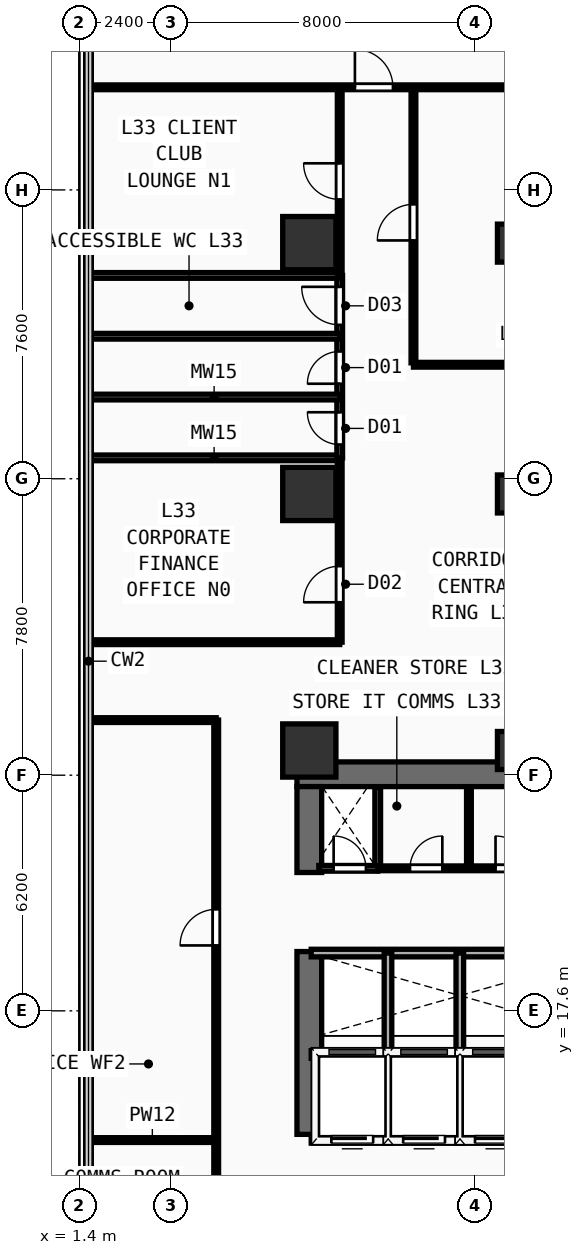
"""IFC4 building model, lengths in metres.
Left out: names, types, materials, properties, quantities, classifications, styles, units other than length and angle.
Written with IfcOpenShell. Run it as: python <this file> out.ifc"""

import sys

from ifc_helpers import new_model, si_unit, direction, frame, frame_2d, origin, origin_2d, place, context, subcontext, project, spatial, rectangle, extrude, element, fill, save


model = new_model("IFC4")
c1 = context("Model", 3, precision=1e-05, world=origin(), true_north=direction((0.0, 1.0)))
c2 = subcontext(c1, "Body", "Model", "MODEL_VIEW")
j1 = project(units=[si_unit("LENGTHUNIT", "METRE"), si_unit("PLANEANGLEUNIT", "RADIAN")], contexts=[c1])
p1 = place(None, origin())
s1 = spatial("IfcSite", under=j1, at=p1, CompositionType="ELEMENT")
p2 = place(p1, origin())
s2 = spatial("IfcBuilding", under=s1, at=p2, CompositionType="ELEMENT")
p3 = place(p2, frame((0.0, 0.0, 129.7)))
s3 = spatial("IfcBuildingStorey", under=s2, at=p3, CompositionType="ELEMENT", Elevation=129.7)
p4 = place(p3, frame((7.125, 23.825, 0.0), z_axis=(0.0, 0.0, 1.0), x_axis=(1.0, 0.0, 0.0)))
e1 = element("IfcWall", 1, at=p4, inside=s3, PredefinedType="SHEAR", context=c2, shape_type="SweptSolid", body=[
    extrude(rectangle(XDim=14.0, YDim=0.65, at=frame_2d((7.0, 0.0))), origin(), (0.0, 0.0, 1.0), 3.54),
])
p5 = place(p3, frame((7.45, 14.35, 0.0), z_axis=(0.0, 0.0, 1.0), x_axis=(0.0, 1.0, 0.0)))
e2 = element("IfcWall", 2, at=p5, inside=s3, PredefinedType="SHEAR", context=c2, shape_type="SweptSolid", body=[
    extrude(rectangle(XDim=4.81, YDim=0.65, at=frame_2d((2.405, 0.0))), origin(), (0.0, 0.0, 1.0), 3.54),
])
p6 = place(p3, frame((7.45, 21.24, 0.0), z_axis=(0.0, 0.0, 1.0), x_axis=(0.0, 1.0, 0.0)))
e3 = element("IfcWall", 3, at=p6, inside=s3, PredefinedType="SHEAR", context=c2, shape_type="SweptSolid", body=[
    extrude(rectangle(XDim=2.26, YDim=0.65, at=frame_2d((1.13, 0.0))), origin(), (0.0, 0.0, 1.0), 3.54),
])
for number, where, z_axis, x_axis in (
    (4, (7.45, 24.45, 0.0), (0.0, 0.0, 1.0), (1.0, 0.0, 0.0)),
    (5, (7.45, 31.2, 0.0), (0.0, 0.0, 1.0), (1.0, 0.0, 0.0)),
    (6, (7.45, 37.8, 0.0), (0.0, 0.0, 1.0), (1.0, 0.0, 0.0)),
):
    element("IfcColumn", number, at=place(p3, frame(where, z_axis=z_axis, x_axis=x_axis)), inside=s3, PredefinedType="COLUMN", context=c2, shape_type="SweptSolid", body=[
        extrude(rectangle(XDim=1.4, YDim=1.4, at=origin_2d()), origin(), (0.0, 0.0, 1.0), 3.54),
    ])
for number, where, z_axis, x_axis in (
    (7, (12.9, 24.45, 0.0), (0.0, 0.0, 1.0), (1.0, 0.0, 0.0)),
    (8, (12.9, 31.2, 0.0), (0.0, 0.0, 1.0), (1.0, 0.0, 0.0)),
    (9, (12.9, 37.8, 0.0), (0.0, 0.0, 1.0), (1.0, 0.0, 0.0)),
):
    element("IfcColumn", number, at=place(p3, frame(where, z_axis=z_axis, x_axis=x_axis)), inside=s3, PredefinedType="COLUMN", context=c2, shape_type="SweptSolid", body=[
        extrude(rectangle(XDim=1.0, YDim=1.0, at=origin_2d()), origin(), (0.0, 0.0, 1.0), 3.54),
    ])
p7 = place(p3, frame((7.5, 14.22, 0.0), z_axis=(0.0, 0.0, 1.0), x_axis=(1.0, 0.0, 0.0)))
e10 = element("IfcWall", 10, at=p7, inside=s3, PredefinedType="PARTITIONING", context=c2, shape_type="SweptSolid", body=[
    extrude(rectangle(XDim=7.85, YDim=0.2, at=frame_2d((3.925, 0.0))), origin(), (0.0, 0.0, 1.0), 3.54),
])
p8 = place(p7, frame((0.53, 0.0, 0.0)))
e11 = element("IfcOpeningElement", 11, at=p8, cuts=e10, PredefinedType="OPENING", context=c2, shape_type="SweptSolid", body=[
    extrude(rectangle(XDim=1.1, YDim=2.2, at=frame_2d((0.55, 1.1))), frame((0.0, 0.11, 0.0), z_axis=(0.0, -1.0, 0.0), x_axis=(1.0, 0.0, 0.0)), (0.0, 0.0, 1.0), 0.22),
])
p9 = place(p7, frame((2.42, 0.0, 0.0)))
e12 = element("IfcOpeningElement", 12, at=p9, cuts=e10, PredefinedType="OPENING", context=c2, shape_type="SweptSolid", body=[
    extrude(rectangle(XDim=1.1, YDim=2.2, at=frame_2d((0.55, 1.1))), frame((0.0, 0.11, 0.0), z_axis=(0.0, -1.0, 0.0), x_axis=(1.0, 0.0, 0.0)), (0.0, 0.0, 1.0), 0.22),
])
p10 = place(p7, frame((4.31, 0.0, 0.0)))
e13 = element("IfcOpeningElement", 13, at=p10, cuts=e10, PredefinedType="OPENING", context=c2, shape_type="SweptSolid", body=[
    extrude(rectangle(XDim=1.1, YDim=2.2, at=frame_2d((0.55, 1.1))), frame((0.0, 0.11, 0.0), z_axis=(0.0, -1.0, 0.0), x_axis=(1.0, 0.0, 0.0)), (0.0, 0.0, 1.0), 0.22),
])
p11 = place(p7, frame((6.2, 0.0, 0.0)))
e14 = element("IfcOpeningElement", 14, at=p11, cuts=e10, PredefinedType="OPENING", context=c2, shape_type="SweptSolid", body=[
    extrude(rectangle(XDim=1.1, YDim=2.2, at=frame_2d((0.55, 1.1))), frame((0.0, 0.11, 0.0), z_axis=(0.0, -1.0, 0.0), x_axis=(1.0, 0.0, 0.0)), (0.0, 0.0, 1.0), 0.22),
])
p12 = place(p3, frame((7.5, 16.45, 0.0), z_axis=(0.0, 0.0, 1.0), x_axis=(1.0, 0.0, 0.0)))
e15 = element("IfcWall", 15, at=p12, inside=s3, PredefinedType="PARTITIONING", context=c2, shape_type="SweptSolid", body=[
    extrude(rectangle(XDim=7.85, YDim=0.2, at=frame_2d((3.925, 0.0))), origin(), (0.0, 0.0, 1.0), 3.54),
])
for number, where, z_axis, x_axis in (
    (16, (9.52, 14.22, 0.0), (0.0, 0.0, 1.0), (0.0, 1.0, 0.0)),
    (17, (11.41, 14.22, 0.0), (0.0, 0.0, 1.0), (0.0, 1.0, 0.0)),
):
    element("IfcWall", number, at=place(p3, frame(where, z_axis=z_axis, x_axis=x_axis)), inside=s3, PredefinedType="PARTITIONING", context=c2, shape_type="SweptSolid", body=[
        extrude(rectangle(XDim=2.23, YDim=0.2, at=frame_2d((1.115, 0.0))), origin(), (0.0, 0.0, 1.0), 3.54),
    ])
p13 = place(p3, frame((7.5, 19.12, 0.0), z_axis=(0.0, 0.0, 1.0), x_axis=(1.0, 0.0, 0.0)))
e18 = element("IfcWall", 18, at=p13, inside=s3, PredefinedType="PARTITIONING", context=c2, shape_type="SweptSolid", body=[
    extrude(rectangle(XDim=7.85, YDim=0.2, at=frame_2d((3.925, 0.0))), origin(), (0.0, 0.0, 1.0), 3.54),
])
for number, where, z_axis, x_axis in (
    (19, (9.52, 16.45, 0.0), (0.0, 0.0, 1.0), (0.0, 1.0, 0.0)),
    (20, (11.41, 16.45, 0.0), (0.0, 0.0, 1.0), (0.0, 1.0, 0.0)),
):
    element("IfcWall", number, at=place(p3, frame(where, z_axis=z_axis, x_axis=x_axis)), inside=s3, PredefinedType="PARTITIONING", context=c2, shape_type="SweptSolid", body=[
        extrude(rectangle(XDim=2.67, YDim=0.2, at=frame_2d((1.335, 0.0))), origin(), (0.0, 0.0, 1.0), 3.54),
    ])
p14 = place(p3, frame((9.25, 21.35, 0.0), z_axis=(0.0, 0.0, 1.0), x_axis=(0.0, 1.0, 0.0)))
e21 = element("IfcWall", 21, at=p14, inside=s3, PredefinedType="PARTITIONING", context=c2, shape_type="SweptSolid", body=[
    extrude(rectangle(XDim=2.13, YDim=0.15, at=frame_2d((1.065, 0.0))), origin(), (0.0, 0.0, 1.0), 3.54),
])
p15 = place(p3, frame((7.7, 21.35, 0.0), z_axis=(0.0, 0.0, 1.0), x_axis=(1.0, 0.0, 0.0)))
e22 = element("IfcWall", 22, at=p15, inside=s3, PredefinedType="PARTITIONING", context=c2, shape_type="SweptSolid", body=[
    extrude(rectangle(XDim=1.55, YDim=0.15, at=frame_2d((0.775, 0.0))), origin(), (0.0, 0.0, 1.0), 3.54),
])
p16 = place(p15, frame((0.39, 0.0, 0.0)))
e23 = element("IfcOpeningElement", 23, at=p16, cuts=e22, PredefinedType="OPENING", context=c2, shape_type="SweptSolid", body=[
    extrude(rectangle(XDim=0.85, YDim=2.15, at=frame_2d((0.425, 1.075))), frame((0.0, 0.085, 0.0), z_axis=(0.0, -1.0, 0.0), x_axis=(1.0, 0.0, 0.0)), (0.0, 0.0, 1.0), 0.17),
])
p17 = place(p3, frame((9.25, 21.35, 0.0), z_axis=(0.0, 0.0, 1.0), x_axis=(1.0, 0.0, 0.0)))
e24 = element("IfcWall", 24, at=p17, inside=s3, PredefinedType="PARTITIONING", context=c2, shape_type="SweptSolid", body=[
    extrude(rectangle(XDim=4.65, YDim=0.125, at=frame_2d((2.325, 0.0))), origin(), (0.0, 0.0, 1.0), 3.54),
])
p18 = place(p17, frame((0.85, 0.0, 0.0)))
e25 = element("IfcOpeningElement", 25, at=p18, cuts=e24, PredefinedType="OPENING", context=c2, shape_type="SweptSolid", body=[
    extrude(rectangle(XDim=0.85, YDim=2.15, at=frame_2d((0.425, 1.075))), frame((0.0, 0.073, 0.0), z_axis=(0.0, -1.0, 0.0), x_axis=(1.0, 0.0, 0.0)), (0.0, 0.0, 1.0), 0.145),
])
p19 = place(p17, frame((3.1, 0.0, 0.0)))
e26 = element("IfcOpeningElement", 26, at=p19, cuts=e24, PredefinedType="OPENING", context=c2, shape_type="SweptSolid", body=[
    extrude(rectangle(XDim=0.85, YDim=2.15, at=frame_2d((0.425, 1.075))), frame((0.0, 0.073, 0.0), z_axis=(0.0, -1.0, 0.0), x_axis=(1.0, 0.0, 0.0)), (0.0, 0.0, 1.0), 0.145),
])
p20 = place(p3, frame((11.65, 21.35, 0.0), z_axis=(0.0, 0.0, 1.0), x_axis=(0.0, 1.0, 0.0)))
e27 = element("IfcWall", 27, at=p20, inside=s3, PredefinedType="PARTITIONING", context=c2, shape_type="SweptSolid", body=[
    extrude(rectangle(XDim=2.13, YDim=0.125, at=frame_2d((1.065, 0.0))), origin(), (0.0, 0.0, 1.0), 3.54),
])
p21 = place(p3, frame((8.25, 27.3, 0.0), z_axis=(0.0, 0.0, 1.0), x_axis=(0.0, 1.0, 0.0)))
e28 = element("IfcWall", 28, at=p21, inside=s3, PredefinedType="PARTITIONING", context=c2, shape_type="SweptSolid", body=[
    extrude(rectangle(XDim=4.85, YDim=0.125, at=frame_2d((2.425, 0.0))), origin(), (0.0, 0.0, 1.0), 3.54),
])
p22 = place(p21, frame((1.05, 0.0, 0.0)))
e29 = element("IfcOpeningElement", 29, at=p22, cuts=e28, PredefinedType="OPENING", context=c2, shape_type="SweptSolid", body=[
    extrude(rectangle(XDim=0.95, YDim=2.15, at=frame_2d((0.475, 1.075))), frame((0.0, 0.073, 0.0), z_axis=(0.0, -1.0, 0.0), x_axis=(1.0, 0.0, 0.0)), (0.0, 0.0, 1.0), 0.145),
])
p23 = place(p3, frame((1.64, 27.3, 0.0), z_axis=(0.0, 0.0, 1.0), x_axis=(1.0, 0.0, 0.0)))
e30 = element("IfcWall", 30, at=p23, inside=s3, PredefinedType="PARTITIONING", context=c2, shape_type="SweptSolid", body=[
    extrude(rectangle(XDim=6.61, YDim=0.125, at=frame_2d((3.305, 0.0))), origin(), (0.0, 0.0, 1.0), 3.54),
])
p24 = place(p3, frame((1.64, 32.15, 0.0), z_axis=(0.0, 0.0, 1.0), x_axis=(1.0, 0.0, 0.0)))
e31 = element("IfcWall", 31, at=p24, inside=s3, PredefinedType="PLUMBINGWALL", context=c2, shape_type="SweptSolid", body=[
    extrude(rectangle(XDim=6.61, YDim=0.15, at=frame_2d((3.305, 0.0))), origin(), (0.0, 0.0, 1.0), 3.54),
])
p25 = place(p3, frame((8.25, 32.15, 0.0), z_axis=(0.0, 0.0, 1.0), x_axis=(0.0, 1.0, 0.0)))
e32 = element("IfcWall", 32, at=p25, inside=s3, PredefinedType="PLUMBINGWALL", context=c2, shape_type="SweptSolid", body=[
    extrude(rectangle(XDim=4.8, YDim=0.15, at=frame_2d((2.4, 0.0))), origin(), (0.0, 0.0, 1.0), 3.54),
])
p26 = place(p25, frame((0.35, 0.0, 0.0)))
e33 = element("IfcOpeningElement", 33, at=p26, cuts=e32, PredefinedType="OPENING", context=c2, shape_type="SweptSolid", body=[
    extrude(rectangle(XDim=0.85, YDim=2.15, at=frame_2d((0.425, 1.075))), frame((0.0, 0.085, 0.0), z_axis=(0.0, -1.0, 0.0), x_axis=(1.0, 0.0, 0.0)), (0.0, 0.0, 1.0), 0.17),
])
p27 = place(p25, frame((1.95, 0.0, 0.0)))
e34 = element("IfcOpeningElement", 34, at=p27, cuts=e32, PredefinedType="OPENING", context=c2, shape_type="SweptSolid", body=[
    extrude(rectangle(XDim=0.85, YDim=2.15, at=frame_2d((0.425, 1.075))), frame((0.0, 0.085, 0.0), z_axis=(0.0, -1.0, 0.0), x_axis=(1.0, 0.0, 0.0)), (0.0, 0.0, 1.0), 0.17),
])
p28 = place(p25, frame((3.5, 0.0, 0.0)))
e35 = element("IfcOpeningElement", 35, at=p28, cuts=e32, PredefinedType="OPENING", context=c2, shape_type="SweptSolid", body=[
    extrude(rectangle(XDim=1.0, YDim=2.2, at=frame_2d((0.5, 1.1))), frame((0.0, 0.085, 0.0), z_axis=(0.0, -1.0, 0.0), x_axis=(1.0, 0.0, 0.0)), (0.0, 0.0, 1.0), 0.17),
])
for number, where, z_axis, x_axis in (
    (36, (1.64, 33.75, 0.0), (0.0, 0.0, 1.0), (1.0, 0.0, 0.0)),
    (37, (1.64, 35.35, 0.0), (0.0, 0.0, 1.0), (1.0, 0.0, 0.0)),
):
    element("IfcWall", number, at=place(p3, frame(where, z_axis=z_axis, x_axis=x_axis)), inside=s3, PredefinedType="PLUMBINGWALL", context=c2, shape_type="SweptSolid", body=[
        extrude(rectangle(XDim=6.61, YDim=0.15, at=frame_2d((3.305, 0.0))), origin(), (0.0, 0.0, 1.0), 3.09),
    ])
p29 = place(p3, frame((1.64, 36.95, 0.0), z_axis=(0.0, 0.0, 1.0), x_axis=(1.0, 0.0, 0.0)))
e38 = element("IfcWall", 38, at=p29, inside=s3, PredefinedType="PLUMBINGWALL", context=c2, shape_type="SweptSolid", body=[
    extrude(rectangle(XDim=6.61, YDim=0.15, at=frame_2d((3.305, 0.0))), origin(), (0.0, 0.0, 1.0), 3.54),
])
p30 = place(p3, frame((5.0, 7.5, 0.0), z_axis=(0.0, 0.0, 1.0), x_axis=(0.0, 1.0, 0.0)))
e39 = element("IfcWall", 39, at=p30, inside=s3, PredefinedType="PARTITIONING", context=c2, shape_type="SweptSolid", body=[
    extrude(rectangle(XDim=17.75, YDim=0.125, at=frame_2d((8.875, 0.0))), origin(), (0.0, 0.0, 1.0), 3.54),
])
p31 = place(p30, frame((2.85, 0.0, 0.0)))
e40 = element("IfcOpeningElement", 40, at=p31, cuts=e39, PredefinedType="OPENING", context=c2, shape_type="SweptSolid", body=[
    extrude(rectangle(XDim=0.95, YDim=2.15, at=frame_2d((0.475, 1.075))), frame((0.0, 0.073, 0.0), z_axis=(0.0, -1.0, 0.0), x_axis=(1.0, 0.0, 0.0)), (0.0, 0.0, 1.0), 0.145),
])
p32 = place(p30, frame((11.821, 0.0, 0.0)))
e41 = element("IfcOpeningElement", 41, at=p32, cuts=e39, PredefinedType="OPENING", context=c2, shape_type="SweptSolid", body=[
    extrude(rectangle(XDim=0.95, YDim=2.15, at=frame_2d((0.475, 1.075))), frame((0.0, 0.073, 0.0), z_axis=(0.0, -1.0, 0.0), x_axis=(1.0, 0.0, 0.0)), (0.0, 0.0, 1.0), 0.145),
])
for number, where, z_axis, x_axis in (
    (42, (1.64, 25.25, 0.0), (0.0, 0.0, 1.0), (1.0, 0.0, 0.0)),
    (43, (1.64, 14.2, 0.0), (0.0, 0.0, 1.0), (1.0, 0.0, 0.0)),
):
    element("IfcWall", number, at=place(p3, frame(where, z_axis=z_axis, x_axis=x_axis)), inside=s3, PredefinedType="PARTITIONING", context=c2, shape_type="SweptSolid", body=[
        extrude(rectangle(XDim=3.36, YDim=0.125, at=frame_2d((1.68, 0.0))), origin(), (0.0, 0.0, 1.0), 3.54),
    ])
p33 = place(p3, frame((10.19, 34.6, 0.0), z_axis=(0.0, 0.0, 1.0), x_axis=(1.0, 0.0, 0.0)))
e44 = element("IfcWall", 44, at=p33, inside=s3, PredefinedType="PARTITIONING", context=c2, shape_type="SweptSolid", body=[
    extrude(rectangle(XDim=13.57, YDim=0.125, at=frame_2d((6.785, 0.0))), origin(), (0.0, 0.0, 1.0), 3.54),
])
p34 = place(p3, frame((8.25, 36.95, 0.0), z_axis=(0.0, 0.0, 1.0), x_axis=(0.0, 1.0, 0.0)))
e45 = element("IfcWall", 45, at=p34, inside=s3, PredefinedType="PARTITIONING", context=c2, shape_type="SweptSolid", body=[
    extrude(rectangle(XDim=4.95, YDim=0.125, at=frame_2d((2.475, 0.0))), origin(), (0.0, 0.0, 1.0), 3.54),
])
p35 = place(p34, frame((2.0, 0.0, 0.0)))
e46 = element("IfcOpeningElement", 46, at=p35, cuts=e45, PredefinedType="OPENING", context=c2, shape_type="SweptSolid", body=[
    extrude(rectangle(XDim=0.95, YDim=2.15, at=frame_2d((0.475, 1.075))), frame((0.0, 0.073, 0.0), z_axis=(0.0, -1.0, 0.0), x_axis=(1.0, 0.0, 0.0)), (0.0, 0.0, 1.0), 0.145),
])
p36 = place(p3, frame((1.64, 41.9, 0.0), z_axis=(0.0, 0.0, 1.0), x_axis=(1.0, 0.0, 0.0)))
e47 = element("IfcWall", 47, at=p36, inside=s3, PredefinedType="PARTITIONING", context=c2, shape_type="SweptSolid", body=[
    extrude(rectangle(XDim=22.12, YDim=0.125, at=frame_2d((11.06, 0.0))), origin(), (0.0, 0.0, 1.0), 3.54),
])
p37 = place(p36, frame((7.01, 0.0, 0.0)))
e48 = element("IfcOpeningElement", 48, at=p37, cuts=e47, PredefinedType="OPENING", context=c2, shape_type="SweptSolid", body=[
    extrude(rectangle(XDim=1.0, YDim=2.2, at=frame_2d((0.5, 1.1))), frame((0.0, 0.073, 0.0), z_axis=(0.0, -1.0, 0.0), x_axis=(1.0, 0.0, 0.0)), (0.0, 0.0, 1.0), 0.145),
])
p38 = place(p3, frame((10.19, 34.65, 0.0), z_axis=(0.0, 0.0, 1.0), x_axis=(0.0, 1.0, 0.0)))
e49 = element("IfcWall", 49, at=p38, inside=s3, PredefinedType="PARTITIONING", context=c2, shape_type="SweptSolid", body=[
    extrude(rectangle(XDim=7.25, YDim=0.125, at=frame_2d((3.625, 0.0))), origin(), (0.0, 0.0, 1.0), 3.54),
])
p39 = place(p38, frame((3.22, 0.0, 0.0)))
e50 = element("IfcOpeningElement", 50, at=p39, cuts=e49, PredefinedType="OPENING", context=c2, shape_type="SweptSolid", body=[
    extrude(rectangle(XDim=0.95, YDim=2.15, at=frame_2d((0.475, 1.075))), frame((0.0, 0.073, 0.0), z_axis=(0.0, -1.0, 0.0), x_axis=(1.0, 0.0, 0.0)), (0.0, 0.0, 1.0), 0.145),
])
p40 = place(p8, frame((1.1, 0.0, 0.0), z_axis=(0.0, 0.0, 1.0), x_axis=(-1.0, 0.0, 0.0)))
e51 = element("IfcDoor", 51, at=p40, inside=s3, OperationType="SLIDING_TO_LEFT", PredefinedType="DOOR", context=c2, shape_type="SweptSolid", body=[
    extrude(rectangle(XDim=1.1, YDim=2.2, at=frame_2d((0.55, 1.1))), frame((0.0, 0.025, 0.0), z_axis=(0.0, -1.0, 0.0), x_axis=(1.0, 0.0, 0.0)), (0.0, 0.0, 1.0), 0.05),
])
fill(e11, e51)
p41 = place(p9, frame((1.1, 0.0, 0.0), z_axis=(0.0, 0.0, 1.0), x_axis=(-1.0, 0.0, 0.0)))
e52 = element("IfcDoor", 52, at=p41, inside=s3, OperationType="SLIDING_TO_LEFT", PredefinedType="DOOR", context=c2, shape_type="SweptSolid", body=[
    extrude(rectangle(XDim=1.1, YDim=2.2, at=frame_2d((0.55, 1.1))), frame((0.0, 0.025, 0.0), z_axis=(0.0, -1.0, 0.0), x_axis=(1.0, 0.0, 0.0)), (0.0, 0.0, 1.0), 0.05),
])
fill(e12, e52)
p42 = place(p10, frame((1.1, 0.0, 0.0), z_axis=(0.0, 0.0, 1.0), x_axis=(-1.0, 0.0, 0.0)))
e53 = element("IfcDoor", 53, at=p42, inside=s3, OperationType="SLIDING_TO_LEFT", PredefinedType="DOOR", context=c2, shape_type="SweptSolid", body=[
    extrude(rectangle(XDim=1.1, YDim=2.2, at=frame_2d((0.55, 1.1))), frame((0.0, 0.025, 0.0), z_axis=(0.0, -1.0, 0.0), x_axis=(1.0, 0.0, 0.0)), (0.0, 0.0, 1.0), 0.05),
])
fill(e13, e53)
p43 = place(p16, origin())
e54 = element("IfcDoor", 54, at=p43, inside=s3, OperationType="SINGLE_SWING_LEFT", PredefinedType="DOOR", context=c2, shape_type="SweptSolid", body=[
    extrude(rectangle(XDim=0.85, YDim=2.15, at=frame_2d((0.425, 1.075))), frame((0.0, 0.025, 0.0), z_axis=(0.0, -1.0, 0.0), x_axis=(1.0, 0.0, 0.0)), (0.0, 0.0, 1.0), 0.05),
])
fill(e23, e54)
p44 = place(p18, origin())
e55 = element("IfcDoor", 55, at=p44, inside=s3, OperationType="SINGLE_SWING_RIGHT", PredefinedType="DOOR", context=c2, shape_type="SweptSolid", body=[
    extrude(rectangle(XDim=0.85, YDim=2.15, at=frame_2d((0.425, 1.075))), frame((0.0, 0.025, 0.0), z_axis=(0.0, -1.0, 0.0), x_axis=(1.0, 0.0, 0.0)), (0.0, 0.0, 1.0), 0.05),
])
fill(e25, e55)
p45 = place(p19, origin())
e56 = element("IfcDoor", 56, at=p45, inside=s3, OperationType="SINGLE_SWING_LEFT", PredefinedType="DOOR", context=c2, shape_type="SweptSolid", body=[
    extrude(rectangle(XDim=0.85, YDim=2.15, at=frame_2d((0.425, 1.075))), frame((0.0, 0.025, 0.0), z_axis=(0.0, -1.0, 0.0), x_axis=(1.0, 0.0, 0.0)), (0.0, 0.0, 1.0), 0.05),
])
fill(e26, e56)
p46 = place(p22, origin())
e57 = element("IfcDoor", 57, at=p46, inside=s3, OperationType="SINGLE_SWING_LEFT", PredefinedType="DOOR", context=c2, shape_type="SweptSolid", body=[
    extrude(rectangle(XDim=0.95, YDim=2.15, at=frame_2d((0.475, 1.075))), frame((0.0, 0.025, 0.0), z_axis=(0.0, -1.0, 0.0), x_axis=(1.0, 0.0, 0.0)), (0.0, 0.0, 1.0), 0.05),
])
fill(e29, e57)
p47 = place(p26, origin())
e58 = element("IfcDoor", 58, at=p47, inside=s3, OperationType="SINGLE_SWING_RIGHT", PredefinedType="DOOR", context=c2, shape_type="SweptSolid", body=[
    extrude(rectangle(XDim=0.85, YDim=2.15, at=frame_2d((0.425, 1.075))), frame((0.0, 0.025, 0.0), z_axis=(0.0, -1.0, 0.0), x_axis=(1.0, 0.0, 0.0)), (0.0, 0.0, 1.0), 0.05),
])
fill(e33, e58)
p48 = place(p27, origin())
e59 = element("IfcDoor", 59, at=p48, inside=s3, OperationType="SINGLE_SWING_LEFT", PredefinedType="DOOR", context=c2, shape_type="SweptSolid", body=[
    extrude(rectangle(XDim=0.85, YDim=2.15, at=frame_2d((0.425, 1.075))), frame((0.0, 0.025, 0.0), z_axis=(0.0, -1.0, 0.0), x_axis=(1.0, 0.0, 0.0)), (0.0, 0.0, 1.0), 0.05),
])
fill(e34, e59)
p49 = place(p28, origin())
e60 = element("IfcDoor", 60, at=p49, inside=s3, OperationType="SINGLE_SWING_RIGHT", PredefinedType="DOOR", context=c2, shape_type="SweptSolid", body=[
    extrude(rectangle(XDim=1.0, YDim=2.2, at=frame_2d((0.5, 1.1))), frame((0.0, 0.025, 0.0), z_axis=(0.0, -1.0, 0.0), x_axis=(1.0, 0.0, 0.0)), (0.0, 0.0, 1.0), 0.05),
])
fill(e35, e60)
p50 = place(p32, origin())
e61 = element("IfcDoor", 61, at=p50, inside=s3, OperationType="SINGLE_SWING_LEFT", PredefinedType="DOOR", context=c2, shape_type="SweptSolid", body=[
    extrude(rectangle(XDim=0.95, YDim=2.15, at=frame_2d((0.475, 1.075))), frame((0.0, 0.025, 0.0), z_axis=(0.0, -1.0, 0.0), x_axis=(1.0, 0.0, 0.0)), (0.0, 0.0, 1.0), 0.05),
])
fill(e41, e61)
p51 = place(p35, origin())
e62 = element("IfcDoor", 62, at=p51, inside=s3, OperationType="SINGLE_SWING_RIGHT", PredefinedType="DOOR", context=c2, shape_type="SweptSolid", body=[
    extrude(rectangle(XDim=0.95, YDim=2.15, at=frame_2d((0.475, 1.075))), frame((0.0, 0.025, 0.0), z_axis=(0.0, -1.0, 0.0), x_axis=(1.0, 0.0, 0.0)), (0.0, 0.0, 1.0), 0.05),
])
fill(e46, e62)
p52 = place(p37, origin())
e63 = element("IfcDoor", 63, at=p52, inside=s3, OperationType="SINGLE_SWING_LEFT", PredefinedType="DOOR", context=c2, shape_type="SweptSolid", body=[
    extrude(rectangle(XDim=1.0, YDim=2.2, at=frame_2d((0.5, 1.1))), frame((0.0, 0.025, 0.0), z_axis=(0.0, -1.0, 0.0), x_axis=(1.0, 0.0, 0.0)), (0.0, 0.0, 1.0), 0.05),
])
fill(e48, e63)
p53 = place(p39, origin())
e64 = element("IfcDoor", 64, at=p53, inside=s3, OperationType="SINGLE_SWING_LEFT", PredefinedType="DOOR", context=c2, shape_type="SweptSolid", body=[
    extrude(rectangle(XDim=0.95, YDim=2.15, at=frame_2d((0.475, 1.075))), frame((0.0, 0.025, 0.0), z_axis=(0.0, -1.0, 0.0), x_axis=(1.0, 0.0, 0.0)), (0.0, 0.0, 1.0), 0.05),
])
fill(e50, e64)
save(model, sys.argv[1])
